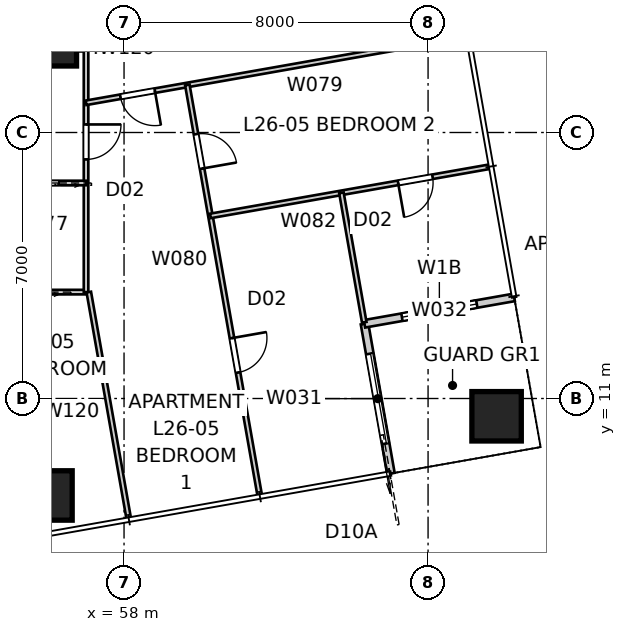
"""IFC4 building model, lengths in metres.
Left out: names, types, materials, properties, quantities, classifications, styles, units other than length and angle.
Written with IfcOpenShell. Run it as: python <this file> out.ifc"""

import sys

from ifc_helpers import new_model, si_unit, direction, frame, frame_2d, origin, origin_2d, place, context, subcontext, project, spatial, rectangle, extrude, element, fill, save


model = new_model("IFC4")
c1 = context("Model", 3, precision=1e-05, world=origin(), true_north=direction((0.0, 1.0)))
c2 = subcontext(c1, "Body", "Model", "MODEL_VIEW")
j1 = project(units=[si_unit("LENGTHUNIT", "METRE"), si_unit("PLANEANGLEUNIT", "RADIAN")], contexts=[c1])
p1 = place(None, origin())
s1 = spatial("IfcSite", under=j1, at=p1, CompositionType="ELEMENT")
p2 = place(p1, origin())
s2 = spatial("IfcBuilding", under=s1, at=p2, CompositionType="ELEMENT")
p3 = place(p2, frame((0.0, 0.0, 96.4)))
s3 = spatial("IfcBuildingStorey", under=s2, at=p3, CompositionType="ELEMENT", Elevation=96.4)
for number, where, z_axis, x_axis in (
    (1, (55.985, 8.448, 0.0), (0.0, 0.0, 1.0), (1.0, 0.0, 0.0)),
    (2, (67.803, 10.532, 0.0), (0.0, 0.0, 1.0), (1.0, 0.0, 0.0)),
):
    element("IfcColumn", number, at=place(p3, frame(where, z_axis=z_axis, x_axis=x_axis)), inside=s3, PredefinedType="COLUMN", context=c2, shape_type="SweptSolid", body=[
        extrude(rectangle(XDim=1.3, YDim=1.3, at=origin_2d()), origin(), (0.0, 0.0, 1.0), 3.4),
    ])
p4 = place(p3, frame((56.0, 20.5, 0.0), z_axis=(0.0, 0.0, 1.0), x_axis=(1.0, 0.0, 0.0)))
e3 = element("IfcColumn", 3, at=p4, inside=s3, PredefinedType="COLUMN", context=c2, shape_type="SweptSolid", body=[
    extrude(rectangle(XDim=1.5, YDim=1.5, at=origin_2d()), origin(), (0.0, 0.0, 1.0), 3.4),
])
p5 = place(p3, frame((65.022, 9.026, 0.0), z_axis=(0.0, 0.0, 1.0), x_axis=(-0.173646056486, 0.984808127031, 0.0)))
e4 = element("IfcWall", 4, at=p5, inside=s3, PredefinedType="SOLIDWALL", context=c2, shape_type="SweptSolid", body=[
    extrude(rectangle(XDim=4.0, YDim=0.2, at=frame_2d((2.0, 0.0))), origin(), (0.0, 0.0, 1.0), 3.25),
])
p6 = place(p5, frame((0.8, 0.0, 0.0)))
e5 = element("IfcOpeningElement", 5, at=p6, cuts=e4, PredefinedType="OPENING", context=c2, shape_type="SweptSolid", body=[
    extrude(rectangle(XDim=2.4, YDim=2.1, at=frame_2d((1.2, 1.05))), frame((0.0, 0.11, 0.0), z_axis=(0.0, -1.0, 0.0), x_axis=(1.0, 0.0, 0.0)), (0.0, 0.0, 1.0), 0.22),
])
p7 = place(p3, frame((64.328, 12.966, 0.0), z_axis=(0.0, 0.0, 1.0), x_axis=(0.984808127031, 0.173646056486, 0.0)))
e6 = element("IfcWall", 6, at=p7, inside=s3, PredefinedType="SOLIDWALL", context=c2, shape_type="SweptSolid", body=[
    extrude(rectangle(XDim=4.0, YDim=0.2, at=frame_2d((2.0, 0.0))), origin(), (0.0, 0.0, 1.0), 3.25),
])
p8 = place(p7, frame((1.0, 0.0, 0.45)))
e7 = element("IfcOpeningElement", 7, at=p8, cuts=e6, PredefinedType="OPENING", context=c2, shape_type="SweptSolid", body=[
    extrude(rectangle(XDim=2.0, YDim=1.8, at=frame_2d((1.0, 0.9))), frame((0.0, 0.11, 0.0), z_axis=(0.0, -1.0, 0.0), x_axis=(1.0, 0.0, 0.0)), (0.0, 0.0, 1.0), 0.22),
])
p9 = place(p3, frame((57.0, 13.8, 0.0), z_axis=(0.0, 0.0, 1.0), x_axis=(-1.0, 0.0, 0.0)))
e8 = element("IfcWall", 8, at=p9, inside=s3, PredefinedType="PARTITIONING", context=c2, shape_type="SweptSolid", body=[
    extrude(rectangle(XDim=34.0, YDim=0.12, at=frame_2d((17.0, 0.0))), origin(), (0.0, 0.0, 1.0), 2.55),
])
p10 = place(p9, frame((8.768, 0.0, 0.0)))
e9 = element("IfcOpeningElement", 9, at=p10, cuts=e8, PredefinedType="OPENING", context=c2, shape_type="SweptSolid", body=[
    extrude(rectangle(XDim=0.92, YDim=2.34, at=frame_2d((0.46, 1.17))), frame((0.0, 0.07, 0.0), z_axis=(0.0, -1.0, 0.0), x_axis=(1.0, 0.0, 0.0)), (0.0, 0.0, 1.0), 0.14),
])
p11 = place(p9, frame((10.995, 0.0, 0.0)))
e10 = element("IfcOpeningElement", 10, at=p11, cuts=e8, PredefinedType="OPENING", context=c2, shape_type="SweptSolid", body=[
    extrude(rectangle(XDim=0.92, YDim=2.34, at=frame_2d((0.46, 1.17))), frame((0.0, 0.07, 0.0), z_axis=(0.0, -1.0, 0.0), x_axis=(1.0, 0.0, 0.0)), (0.0, 0.0, 1.0), 0.14),
])
p12 = place(p9, frame((15.486, 0.0, 0.0)))
e11 = element("IfcOpeningElement", 11, at=p12, cuts=e8, PredefinedType="OPENING", context=c2, shape_type="SweptSolid", body=[
    extrude(rectangle(XDim=0.92, YDim=2.34, at=frame_2d((0.46, 1.17))), frame((0.0, 0.07, 0.0), z_axis=(0.0, -1.0, 0.0), x_axis=(1.0, 0.0, 0.0)), (0.0, 0.0, 1.0), 0.14),
])
p13 = place(p9, frame((4.804, 0.0, 0.0)))
e12 = element("IfcOpeningElement", 12, at=p13, cuts=e8, PredefinedType="OPENING", context=c2, shape_type="SweptSolid", body=[
    extrude(rectangle(XDim=0.96, YDim=2.1, at=frame_2d((0.48, 1.05))), frame((0.0, 0.07, 0.0), z_axis=(0.0, -1.0, 0.0), x_axis=(1.0, 0.0, 0.0)), (0.0, 0.0, 1.0), 0.14),
])
p14 = place(p9, frame((19.155, 0.0, 0.0)))
e13 = element("IfcOpeningElement", 13, at=p14, cuts=e8, PredefinedType="OPENING", context=c2, shape_type="SweptSolid", body=[
    extrude(rectangle(XDim=0.96, YDim=2.1, at=frame_2d((0.48, 1.05))), frame((0.0, 0.07, 0.0), z_axis=(0.0, -1.0, 0.0), x_axis=(1.0, 0.0, 0.0)), (0.0, 0.0, 1.0), 0.14),
])
p15 = place(p9, frame((31.473, 0.0, 0.0)))
e14 = element("IfcOpeningElement", 14, at=p15, cuts=e8, PredefinedType="OPENING", context=c2, shape_type="SweptSolid", body=[
    extrude(rectangle(XDim=0.96, YDim=2.1, at=frame_2d((0.48, 1.05))), frame((0.0, 0.07, 0.0), z_axis=(0.0, -1.0, 0.0), x_axis=(1.0, 0.0, 0.0)), (0.0, 0.0, 1.0), 0.14),
])
p16 = place(p9, frame((1.261, 0.0, 0.0)))
e15 = element("IfcOpeningElement", 15, at=p16, cuts=e8, PredefinedType="OPENING", context=c2, shape_type="SweptSolid", body=[
    extrude(rectangle(XDim=0.96, YDim=2.1, at=frame_2d((0.48, 1.05))), frame((0.0, 0.07, 0.0), z_axis=(0.0, -1.0, 0.0), x_axis=(1.0, 0.0, 0.0)), (0.0, 0.0, 1.0), 0.14),
])
p17 = place(p9, frame((22.627, 0.0, 0.0)))
e16 = element("IfcOpeningElement", 16, at=p17, cuts=e8, PredefinedType="OPENING", context=c2, shape_type="SweptSolid", body=[
    extrude(rectangle(XDim=0.96, YDim=2.1, at=frame_2d((0.48, 1.05))), frame((0.0, 0.07, 0.0), z_axis=(0.0, -1.0, 0.0), x_axis=(1.0, 0.0, 0.0)), (0.0, 0.0, 1.0), 0.14),
])
p18 = place(p3, frame((57.0, 46.2, 0.0), z_axis=(0.0, 0.0, 1.0), x_axis=(0.0, -1.0, 0.0)))
e17 = element("IfcWall", 17, at=p18, inside=s3, PredefinedType="PARTITIONING", context=c2, shape_type="SweptSolid", body=[
    extrude(rectangle(XDim=32.4, YDim=0.12, at=frame_2d((16.2, 0.0))), origin(), (0.0, 0.0, 1.0), 2.55),
])
p19 = place(p18, frame((10.396, 0.0, 0.0)))
e18 = element("IfcOpeningElement", 18, at=p19, cuts=e17, PredefinedType="OPENING", context=c2, shape_type="SweptSolid", body=[
    extrude(rectangle(XDim=0.92, YDim=2.34, at=frame_2d((0.46, 1.17))), frame((0.0, 0.07, 0.0), z_axis=(0.0, -1.0, 0.0), x_axis=(1.0, 0.0, 0.0)), (0.0, 0.0, 1.0), 0.14),
])
p20 = place(p18, frame((7.587, 0.0, 0.0)))
e19 = element("IfcOpeningElement", 19, at=p20, cuts=e17, PredefinedType="OPENING", context=c2, shape_type="SweptSolid", body=[
    extrude(rectangle(XDim=0.92, YDim=2.34, at=frame_2d((0.46, 1.17))), frame((0.0, 0.07, 0.0), z_axis=(0.0, -1.0, 0.0), x_axis=(1.0, 0.0, 0.0)), (0.0, 0.0, 1.0), 0.14),
])
p21 = place(p18, frame((3.843, 0.0, 0.0)))
e20 = element("IfcOpeningElement", 20, at=p21, cuts=e17, PredefinedType="OPENING", context=c2, shape_type="SweptSolid", body=[
    extrude(rectangle(XDim=0.92, YDim=2.34, at=frame_2d((0.46, 1.17))), frame((0.0, 0.07, 0.0), z_axis=(0.0, -1.0, 0.0), x_axis=(1.0, 0.0, 0.0)), (0.0, 0.0, 1.0), 0.14),
])
p22 = place(p18, frame((27.988, 0.0, 0.0)))
e21 = element("IfcOpeningElement", 21, at=p22, cuts=e17, PredefinedType="OPENING", context=c2, shape_type="SweptSolid", body=[
    extrude(rectangle(XDim=0.92, YDim=2.34, at=frame_2d((0.46, 1.17))), frame((0.0, 0.07, 0.0), z_axis=(0.0, -1.0, 0.0), x_axis=(1.0, 0.0, 0.0)), (0.0, 0.0, 1.0), 0.14),
])
p23 = place(p18, frame((23.957, 0.0, 0.0)))
e22 = element("IfcOpeningElement", 22, at=p23, cuts=e17, PredefinedType="OPENING", context=c2, shape_type="SweptSolid", body=[
    extrude(rectangle(XDim=0.96, YDim=2.1, at=frame_2d((0.48, 1.05))), frame((0.0, 0.07, 0.0), z_axis=(0.0, -1.0, 0.0), x_axis=(1.0, 0.0, 0.0)), (0.0, 0.0, 1.0), 0.14),
])
p24 = place(p18, frame((21.108, 0.0, 0.0)))
e23 = element("IfcOpeningElement", 23, at=p24, cuts=e17, PredefinedType="OPENING", context=c2, shape_type="SweptSolid", body=[
    extrude(rectangle(XDim=0.96, YDim=2.1, at=frame_2d((0.48, 1.05))), frame((0.0, 0.07, 0.0), z_axis=(0.0, -1.0, 0.0), x_axis=(1.0, 0.0, 0.0)), (0.0, 0.0, 1.0), 0.14),
])
p25 = place(p3, frame((57.0, 16.671, 0.0), z_axis=(0.0, 0.0, 1.0), x_axis=(-1.0, 0.0, 0.0)))
e24 = element("IfcWall", 24, at=p25, inside=s3, PredefinedType="PARTITIONING", context=c2, shape_type="SweptSolid", body=[
    extrude(rectangle(XDim=2.4, YDim=0.12, at=frame_2d((1.2, 0.0))), origin(), (0.0, 0.0, 1.0), 3.25),
])
p26 = place(p25, frame((0.72, 0.0, 0.0)))
e25 = element("IfcOpeningElement", 25, at=p26, cuts=e24, PredefinedType="OPENING", context=c2, shape_type="SweptSolid", body=[
    extrude(rectangle(XDim=0.96, YDim=2.1, at=frame_2d((0.48, 1.05))), frame((0.0, 0.07, 0.0), z_axis=(0.0, -1.0, 0.0), x_axis=(1.0, 0.0, 0.0)), (0.0, 0.0, 1.0), 0.14),
])
p27 = place(p3, frame((67.012, 20.547, 0.0), z_axis=(0.0, 0.0, 1.0), x_axis=(-0.984807724889, -0.173648337162, 0.0)))
e26 = element("IfcWall", 26, at=p27, inside=s3, PredefinedType="PARTITIONING", context=c2, shape_type="SweptSolid", body=[
    extrude(rectangle(XDim=10.167, YDim=0.12, at=frame_2d((5.083, 0.0))), origin(), (0.0, 0.0, 1.0), 2.638),
])
p28 = place(p27, frame((8.328, 0.0, 0.0)))
e27 = element("IfcOpeningElement", 27, at=p28, cuts=e26, PredefinedType="OPENING", context=c2, shape_type="SweptSolid", body=[
    extrude(rectangle(XDim=0.92, YDim=2.34, at=frame_2d((0.46, 1.17))), frame((0.0, 0.07, 0.0), z_axis=(0.0, -1.0, 0.0), x_axis=(1.0, 0.0, 0.0)), (0.0, 0.0, 1.0), 0.14),
])
p29 = place(p3, frame((59.665, 19.251, 0.0), z_axis=(0.0, 0.0, 1.0), x_axis=(0.173639194339, -0.984809336973, 0.0)))
e28 = element("IfcWall", 28, at=p29, inside=s3, PredefinedType="PARTITIONING", context=c2, shape_type="SweptSolid", body=[
    extrude(rectangle(XDim=10.96, YDim=0.12, at=frame_2d((5.48, 0.0))), origin(), (0.0, 0.0, 1.0), 3.25),
])
p30 = place(p29, frame((6.765, 0.0, 0.0)))
e29 = element("IfcOpeningElement", 29, at=p30, cuts=e28, PredefinedType="OPENING", context=c2, shape_type="SweptSolid", body=[
    extrude(rectangle(XDim=0.92, YDim=2.34, at=frame_2d((0.46, 1.17))), frame((0.0, 0.07, 0.0), z_axis=(0.0, -1.0, 0.0), x_axis=(1.0, 0.0, 0.0)), (0.0, 0.0, 1.0), 0.14),
])
p31 = place(p29, frame((1.315, 0.0, 0.0)))
e30 = element("IfcOpeningElement", 30, at=p31, cuts=e28, PredefinedType="OPENING", context=c2, shape_type="SweptSolid", body=[
    extrude(rectangle(XDim=0.92, YDim=2.34, at=frame_2d((0.46, 1.17))), frame((0.0, 0.07, 0.0), z_axis=(0.0, -1.0, 0.0), x_axis=(1.0, 0.0, 0.0)), (0.0, 0.0, 1.0), 0.14),
])
p32 = place(p3, frame((58.122, 7.85, 0.0), z_axis=(0.0, 0.0, 1.0), x_axis=(-0.173644708382, 0.984808364734, 0.0)))
e31 = element("IfcWall", 31, at=p32, inside=s3, PredefinedType="PARTITIONING", context=c2, shape_type="SweptSolid", body=[
    extrude(rectangle(XDim=6.042, YDim=0.12, at=frame_2d((3.021, 0.0))), origin(), (0.0, 0.0, 1.0), 2.638),
])
p33 = place(p3, frame((67.62, 17.1, 0.0), z_axis=(0.0, 0.0, 1.0), x_axis=(-0.984807929323, -0.173647177755, 0.0)))
e32 = element("IfcWall", 32, at=p33, inside=s3, PredefinedType="PARTITIONING", context=c2, shape_type="SweptSolid", body=[
    extrude(rectangle(XDim=7.46, YDim=0.12, at=frame_2d((3.73, 0.0))), origin(), (0.0, 0.0, 1.0), 3.25),
])
p34 = place(p33, frame((1.525, 0.0, 0.0)))
e33 = element("IfcOpeningElement", 33, at=p34, cuts=e32, PredefinedType="OPENING", context=c2, shape_type="SweptSolid", body=[
    extrude(rectangle(XDim=0.92, YDim=2.34, at=frame_2d((0.46, 1.17))), frame((0.0, 0.07, 0.0), z_axis=(0.0, -1.0, 0.0), x_axis=(1.0, 0.0, 0.0)), (0.0, 0.0, 1.0), 0.14),
])
p35 = place(p3, frame((63.72, 16.412, 0.0), z_axis=(0.0, 0.0, 1.0), x_axis=(0.173660541335, -0.984805572884, 0.0)))
e34 = element("IfcWall", 34, at=p35, inside=s3, PredefinedType="PARTITIONING", context=c2, shape_type="SweptSolid", body=[
    extrude(rectangle(XDim=3.46, YDim=0.12, at=frame_2d((1.73, 0.0))), origin(), (0.0, 0.0, 1.0), 3.25),
])
p36 = place(p6, origin())
e35 = element("IfcDoor", 35, at=p36, inside=s3, OperationType="SLIDING_TO_LEFT", PredefinedType="DOOR", context=c2, shape_type="SweptSolid", body=[
    extrude(rectangle(XDim=2.4, YDim=2.1, at=frame_2d((1.2, 1.05))), frame((0.0, 0.025, 0.0), z_axis=(0.0, -1.0, 0.0), x_axis=(1.0, 0.0, 0.0)), (0.0, 0.0, 1.0), 0.05),
])
fill(e5, e35)
p37 = place(p8, origin())
e36 = element("IfcWindow", 36, at=p37, inside=s3, PartitioningType="SINGLE_PANEL", PredefinedType="WINDOW", context=c2, shape_type="SweptSolid", body=[
    extrude(rectangle(XDim=2.0, YDim=1.8, at=frame_2d((1.0, 0.9))), frame((0.0, 0.03, 0.0), z_axis=(0.0, -1.0, 0.0), x_axis=(1.0, 0.0, 0.0)), (0.0, 0.0, 1.0), 0.06),
])
fill(e7, e36)
p38 = place(p26, origin())
e37 = element("IfcDoor", 37, at=p38, inside=s3, OperationType="SLIDING_TO_LEFT", PredefinedType="DOOR", context=c2, shape_type="SweptSolid", body=[
    extrude(rectangle(XDim=0.96, YDim=2.1, at=frame_2d((0.48, 1.05))), frame((0.0, 0.025, 0.0), z_axis=(0.0, -1.0, 0.0), x_axis=(1.0, 0.0, 0.0)), (0.0, 0.0, 1.0), 0.05),
])
fill(e25, e37)
p39 = place(p22, origin())
e38 = element("IfcDoor", 38, at=p39, inside=s3, OperationType="SINGLE_SWING_LEFT", PredefinedType="DOOR", context=c2, shape_type="SweptSolid", body=[
    extrude(rectangle(XDim=0.92, YDim=2.34, at=frame_2d((0.46, 1.17))), frame((0.0, 0.025, 0.0), z_axis=(0.0, -1.0, 0.0), x_axis=(1.0, 0.0, 0.0)), (0.0, 0.0, 1.0), 0.05),
])
fill(e21, e38)
p40 = place(p30, origin())
e39 = element("IfcDoor", 39, at=p40, inside=s3, OperationType="SINGLE_SWING_LEFT", PredefinedType="DOOR", context=c2, shape_type="SweptSolid", body=[
    extrude(rectangle(XDim=0.92, YDim=2.34, at=frame_2d((0.46, 1.17))), frame((0.0, 0.025, 0.0), z_axis=(0.0, -1.0, 0.0), x_axis=(1.0, 0.0, 0.0)), (0.0, 0.0, 1.0), 0.05),
])
fill(e29, e39)
p41 = place(p31, origin())
e40 = element("IfcDoor", 40, at=p41, inside=s3, OperationType="SINGLE_SWING_RIGHT", PredefinedType="DOOR", context=c2, shape_type="SweptSolid", body=[
    extrude(rectangle(XDim=0.92, YDim=2.34, at=frame_2d((0.46, 1.17))), frame((0.0, 0.025, 0.0), z_axis=(0.0, -1.0, 0.0), x_axis=(1.0, 0.0, 0.0)), (0.0, 0.0, 1.0), 0.05),
])
fill(e30, e40)
p42 = place(p28, origin())
e41 = element("IfcDoor", 41, at=p42, inside=s3, OperationType="SINGLE_SWING_LEFT", PredefinedType="DOOR", context=c2, shape_type="SweptSolid", body=[
    extrude(rectangle(XDim=0.92, YDim=2.34, at=frame_2d((0.46, 1.17))), frame((0.0, 0.025, 0.0), z_axis=(0.0, -1.0, 0.0), x_axis=(1.0, 0.0, 0.0)), (0.0, 0.0, 1.0), 0.05),
])
fill(e27, e41)
p43 = place(p34, origin())
e42 = element("IfcDoor", 42, at=p43, inside=s3, OperationType="SINGLE_SWING_RIGHT", PredefinedType="DOOR", context=c2, shape_type="SweptSolid", body=[
    extrude(rectangle(XDim=0.92, YDim=2.34, at=frame_2d((0.46, 1.17))), frame((0.0, 0.025, 0.0), z_axis=(0.0, -1.0, 0.0), x_axis=(1.0, 0.0, 0.0)), (0.0, 0.0, 1.0), 0.05),
])
fill(e33, e42)
save(model, sys.argv[1])
